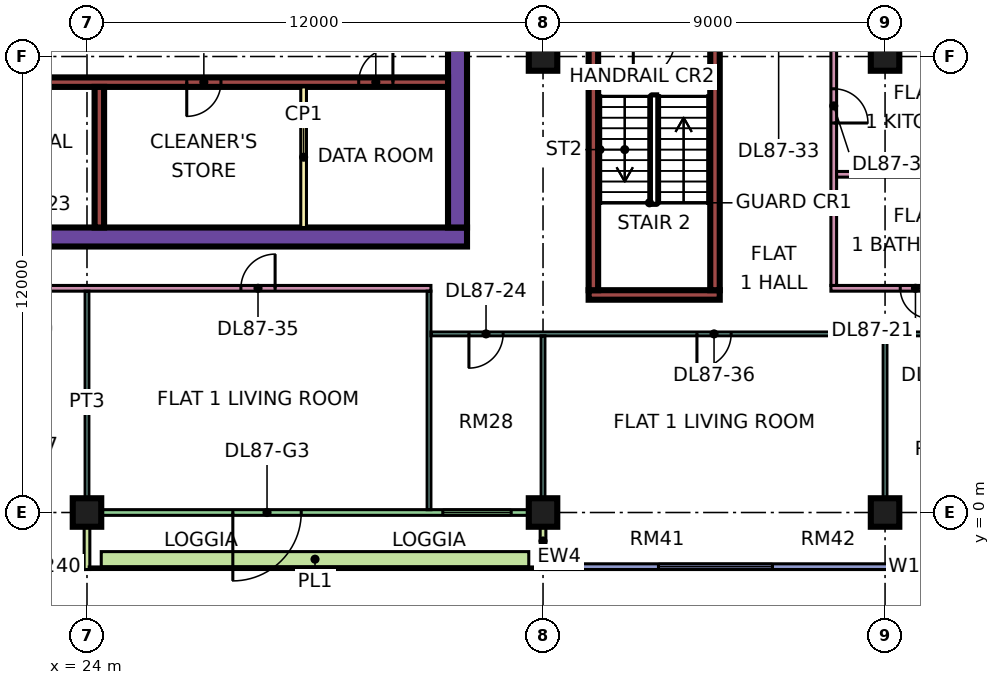
"""IFC4 building model, lengths in metres.
Left out: names, types, materials, properties, quantities, classifications, styles, units other than length and angle.
Written with IfcOpenShell. Run it as: python <this file> out.ifc"""

import sys

from ifc_helpers import new_model, si_unit, direction, frame, frame_2d, origin, origin_2d, place, context, subcontext, project, spatial, rectangle, extrude, element, fill, save


model = new_model("IFC4")
c1 = context("Model", 3, precision=1e-05, world=origin(), true_north=direction((0.0, 1.0)))
c2 = subcontext(c1, "Body", "Model", "MODEL_VIEW")
j1 = project(units=[si_unit("LENGTHUNIT", "METRE"), si_unit("PLANEANGLEUNIT", "RADIAN")], contexts=[c1])
p1 = place(None, origin())
s1 = spatial("IfcSite", under=j1, at=p1, CompositionType="ELEMENT")
p2 = place(p1, origin())
s2 = spatial("IfcBuilding", under=s1, at=p2, CompositionType="ELEMENT")
p3 = place(p2, frame((0.0, 0.0, 372.65)))
s3 = spatial("IfcBuildingStorey", under=s2, at=p3, CompositionType="ELEMENT", Elevation=372.65)
for number, where, z_axis, x_axis in (
    (1, (24.0, 0.0, 0.0), (0.0, 0.0, 1.0), (1.0, 0.0, 0.0)),
    (2, (36.0, 0.0, 0.0), (0.0, 0.0, 1.0), (1.0, 0.0, 0.0)),
    (3, (36.0, 12.0, 0.0), (0.0, 0.0, 1.0), (1.0, 0.0, 0.0)),
    (4, (45.0, 0.0, 0.0), (0.0, 0.0, 1.0), (1.0, 0.0, 0.0)),
    (5, (45.0, 12.0, 0.0), (0.0, 0.0, 1.0), (1.0, 0.0, 0.0)),
):
    element("IfcColumn", number, at=place(p3, frame(where, z_axis=z_axis, x_axis=x_axis)), inside=s3, PredefinedType="COLUMN", context=c2, shape_type="SweptSolid", body=[
        extrude(rectangle(XDim=0.75, YDim=0.75, at=origin_2d()), origin(), (0.0, 0.0, 1.0), 3.75),
    ])
p4 = place(p3, frame((9.0, 7.25, 0.0), z_axis=(0.0, 0.0, 1.0), x_axis=(1.0, 0.0, 0.0)))
e6 = element("IfcWall", 6, at=p4, inside=s3, PredefinedType="SHEAR", context=c2, shape_type="SweptSolid", body=[
    extrude(rectangle(XDim=25.0, YDim=0.5, at=frame_2d((12.5, 0.0))), origin(), (0.0, 0.0, 1.0), 3.75),
])
p5 = place(p3, frame((33.75, 7.5, 0.0), z_axis=(0.0, 0.0, 1.0), x_axis=(0.0, 1.0, 0.0)))
e7 = element("IfcWall", 7, at=p5, inside=s3, PredefinedType="SHEAR", context=c2, shape_type="SweptSolid", body=[
    extrude(rectangle(XDim=12.0, YDim=0.5, at=frame_2d((6.0, 0.0))), origin(), (0.0, 0.0, 1.0), 3.75),
])
p6 = place(p5, frame((5.7, 0.0, 0.0)))
e8 = element("IfcOpeningElement", 8, at=p6, cuts=e7, PredefinedType="OPENING", context=c2, shape_type="SweptSolid", body=[
    extrude(rectangle(XDim=1.8, YDim=2.4, at=frame_2d((0.9, 1.2))), frame((0.0, 0.26, 0.0), z_axis=(0.0, -1.0, 0.0), x_axis=(1.0, 0.0, 0.0)), (0.0, 0.0, 1.0), 0.52),
])
p7 = place(p3, frame((13.45, 11.325, 0.0), z_axis=(0.0, 0.0, 1.0), x_axis=(1.0, 0.0, 0.0)))
e9 = element("IfcWall", 9, at=p7, inside=s3, PredefinedType="SHEAR", context=c2, shape_type="SweptSolid", body=[
    extrude(rectangle(XDim=20.05, YDim=0.25, at=frame_2d((10.025, 0.0))), origin(), (0.0, 0.0, 1.0), 3.75),
])
p8 = place(p7, frame((2.8, 0.0, 0.0)))
e10 = element("IfcOpeningElement", 10, at=p8, cuts=e9, PredefinedType="OPENING", context=c2, shape_type="SweptSolid", body=[
    extrude(rectangle(XDim=0.9, YDim=2.1, at=frame_2d((0.45, 1.05))), frame((0.0, 0.135, 0.0), z_axis=(0.0, -1.0, 0.0), x_axis=(1.0, 0.0, 0.0)), (0.0, 0.0, 1.0), 0.27),
])
p9 = place(p7, frame((8.175, 0.0, 0.0)))
e11 = element("IfcOpeningElement", 11, at=p9, cuts=e9, PredefinedType="OPENING", context=c2, shape_type="SweptSolid", body=[
    extrude(rectangle(XDim=0.9, YDim=2.1, at=frame_2d((0.45, 1.05))), frame((0.0, 0.135, 0.0), z_axis=(0.0, -1.0, 0.0), x_axis=(1.0, 0.0, 0.0)), (0.0, 0.0, 1.0), 0.27),
])
p10 = place(p7, frame((13.175, 0.0, 0.0)))
e12 = element("IfcOpeningElement", 12, at=p10, cuts=e9, PredefinedType="OPENING", context=c2, shape_type="SweptSolid", body=[
    extrude(rectangle(XDim=0.9, YDim=2.1, at=frame_2d((0.45, 1.05))), frame((0.0, 0.135, 0.0), z_axis=(0.0, -1.0, 0.0), x_axis=(1.0, 0.0, 0.0)), (0.0, 0.0, 1.0), 0.27),
])
p11 = place(p7, frame((17.7, 0.0, 0.0)))
e13 = element("IfcOpeningElement", 13, at=p11, cuts=e9, PredefinedType="OPENING", context=c2, shape_type="SweptSolid", body=[
    extrude(rectangle(XDim=0.9, YDim=2.1, at=frame_2d((0.45, 1.05))), frame((0.0, 0.135, 0.0), z_axis=(0.0, -1.0, 0.0), x_axis=(1.0, 0.0, 0.0)), (0.0, 0.0, 1.0), 0.27),
])
p12 = place(p3, frame((24.325, 7.5, 0.0), z_axis=(0.0, 0.0, 1.0), x_axis=(0.0, 1.0, 0.0)))
e14 = element("IfcWall", 14, at=p12, inside=s3, PredefinedType="SHEAR", context=c2, shape_type="SweptSolid", body=[
    extrude(rectangle(XDim=3.7, YDim=0.25, at=frame_2d((1.85, 0.0))), origin(), (0.0, 0.0, 1.0), 3.75),
])
p13 = place(p3, frame((37.2, 5.725, 0.0), z_axis=(0.0, 0.0, 1.0), x_axis=(1.0, 0.0, 0.0)))
e15 = element("IfcWall", 15, at=p13, inside=s3, PredefinedType="SHEAR", context=c2, shape_type="SweptSolid", body=[
    extrude(rectangle(XDim=3.45, YDim=0.25, at=frame_2d((1.725, 0.0))), origin(), (0.0, 0.0, 1.0), 3.75),
])
for number, where, z_axis, x_axis in (
    (16, (37.325, 5.85, 0.0), (0.0, 0.0, 1.0), (0.0, 1.0, 0.0)),
    (17, (40.525, 5.85, 0.0), (0.0, 0.0, 1.0), (0.0, 1.0, 0.0)),
):
    element("IfcWall", number, at=place(p3, frame(where, z_axis=z_axis, x_axis=x_axis)), inside=s3, PredefinedType="SHEAR", context=c2, shape_type="SweptSolid", body=[
        extrude(rectangle(XDim=6.5, YDim=0.25, at=frame_2d((3.25, 0.0))), origin(), (0.0, 0.0, 1.0), 3.75),
    ])
p14 = place(p3, frame((12.5, -1.425, 0.0), z_axis=(0.0, 0.0, 1.0), x_axis=(1.0, 0.0, 0.0)))
e18 = element("IfcWall", 18, at=p14, inside=s3, PredefinedType="SOLIDWALL", context=c2, shape_type="SweptSolid", body=[
    extrude(rectangle(XDim=11.425, YDim=0.15, at=frame_2d((5.712, 0.0))), origin(), (0.0, 0.0, 1.0), 3.35),
])
p15 = place(p14, frame((0.35, 0.0, 0.45)))
e19 = element("IfcOpeningElement", 19, at=p15, cuts=e18, PredefinedType="OPENING", context=c2, shape_type="SweptSolid", body=[
    extrude(rectangle(XDim=1.8, YDim=2.4, at=frame_2d((0.9, 1.2))), frame((0.0, 0.085, 0.0), z_axis=(0.0, -1.0, 0.0), x_axis=(1.0, 0.0, 0.0)), (0.0, 0.0, 1.0), 0.17),
])
p16 = place(p14, frame((4.0, 0.0, 0.45)))
e20 = element("IfcOpeningElement", 20, at=p16, cuts=e18, PredefinedType="OPENING", context=c2, shape_type="SweptSolid", body=[
    extrude(rectangle(XDim=3.0, YDim=2.4, at=frame_2d((1.5, 1.2))), frame((0.0, 0.085, 0.0), z_axis=(0.0, -1.0, 0.0), x_axis=(1.0, 0.0, 0.0)), (0.0, 0.0, 1.0), 0.17),
])
p17 = place(p14, frame((9.062, 0.0, 0.45)))
e21 = element("IfcOpeningElement", 21, at=p17, cuts=e18, PredefinedType="OPENING", context=c2, shape_type="SweptSolid", body=[
    extrude(rectangle(XDim=1.8, YDim=2.4, at=frame_2d((0.9, 1.2))), frame((0.0, 0.085, 0.0), z_axis=(0.0, -1.0, 0.0), x_axis=(1.0, 0.0, 0.0)), (0.0, 0.0, 1.0), 0.17),
])
p18 = place(p3, frame((24.075, 0.0, 0.0), z_axis=(0.0, 0.0, 1.0), x_axis=(1.0, 0.0, 0.0)))
e22 = element("IfcWall", 22, at=p18, inside=s3, PredefinedType="SOLIDWALL", context=c2, shape_type="SweptSolid", body=[
    extrude(rectangle(XDim=11.85, YDim=0.15, at=frame_2d((5.925, 0.0))), origin(), (0.0, 0.0, 1.0), 3.35),
])
p19 = place(p18, frame((3.762, 0.0, 0.0)))
e23 = element("IfcOpeningElement", 23, at=p19, cuts=e22, PredefinedType="OPENING", context=c2, shape_type="SweptSolid", body=[
    extrude(rectangle(XDim=1.8, YDim=2.4, at=frame_2d((0.9, 1.2))), frame((0.0, 0.085, 0.0), z_axis=(0.0, -1.0, 0.0), x_axis=(1.0, 0.0, 0.0)), (0.0, 0.0, 1.0), 0.17),
])
p20 = place(p18, frame((9.288, 0.0, 0.45)))
e24 = element("IfcOpeningElement", 24, at=p20, cuts=e22, PredefinedType="OPENING", context=c2, shape_type="SweptSolid", body=[
    extrude(rectangle(XDim=1.8, YDim=2.4, at=frame_2d((0.9, 1.2))), frame((0.0, 0.085, 0.0), z_axis=(0.0, -1.0, 0.0), x_axis=(1.0, 0.0, 0.0)), (0.0, 0.0, 1.0), 0.17),
])
for number, where, z_axis, x_axis in (
    (25, (24.0, -1.5, 0.0), (0.0, 0.0, 1.0), (0.0, 1.0, 0.0)),
    (26, (36.0, -1.5, 0.0), (0.0, 0.0, 1.0), (0.0, 1.0, 0.0)),
):
    element("IfcWall", number, at=place(p3, frame(where, z_axis=z_axis, x_axis=x_axis)), inside=s3, PredefinedType="SOLIDWALL", context=c2, shape_type="SweptSolid", body=[
        extrude(rectangle(XDim=1.5, YDim=0.15, at=frame_2d((0.75, 0.0))), origin(), (0.0, 0.0, 1.0), 3.35),
    ])
p21 = place(p3, frame((36.075, -1.425, 0.0), z_axis=(0.0, 0.0, 1.0), x_axis=(1.0, 0.0, 0.0)))
e27 = element("IfcWall", 27, at=p21, inside=s3, PredefinedType="SOLIDWALL", context=c2, shape_type="SweptSolid", body=[
    extrude(rectangle(XDim=11.85, YDim=0.15, at=frame_2d((5.925, 0.0))), origin(), (0.0, 0.0, 1.0), 3.35),
])
p22 = place(p21, frame((2.962, 0.0, 0.45)))
e28 = element("IfcOpeningElement", 28, at=p22, cuts=e27, PredefinedType="OPENING", context=c2, shape_type="SweptSolid", body=[
    extrude(rectangle(XDim=3.0, YDim=2.4, at=frame_2d((1.5, 1.2))), frame((0.0, 0.085, 0.0), z_axis=(0.0, -1.0, 0.0), x_axis=(1.0, 0.0, 0.0)), (0.0, 0.0, 1.0), 0.17),
])
p23 = place(p21, frame((9.488, 0.0, 0.45)))
e29 = element("IfcOpeningElement", 29, at=p23, cuts=e27, PredefinedType="OPENING", context=c2, shape_type="SweptSolid", body=[
    extrude(rectangle(XDim=1.8, YDim=2.4, at=frame_2d((0.9, 1.2))), frame((0.0, 0.085, 0.0), z_axis=(0.0, -1.0, 0.0), x_axis=(1.0, 0.0, 0.0)), (0.0, 0.0, 1.0), 0.17),
])
p24 = place(p3, frame((24.375, -1.229, 0.0), z_axis=(0.0, 0.0, 1.0), x_axis=(1.0, 0.0, 0.0)))
e30 = element("IfcWall", 30, at=p24, inside=s3, PredefinedType="SOLIDWALL", context=c2, shape_type="SweptSolid", body=[
    extrude(rectangle(XDim=11.25, YDim=0.4, at=frame_2d((5.625, 0.0))), origin(), (0.0, 0.0, 1.0), 0.7),
])
p25 = place(p3, frame((29.7, 7.5, 0.0), z_axis=(0.0, 0.0, 1.0), x_axis=(0.0, 1.0, 0.0)))
e31 = element("IfcWall", 31, at=p25, inside=s3, PredefinedType="PARTITIONING", context=c2, shape_type="SweptSolid", body=[
    extrude(rectangle(XDim=3.7, YDim=0.15, at=frame_2d((1.85, 0.0))), origin(), (0.0, 0.0, 1.0), 3.35),
])
p26 = place(p3, frame((11.95, 5.9, 0.0), z_axis=(0.0, 0.0, 1.0), x_axis=(1.0, 0.0, 0.0)))
e32 = element("IfcWall", 32, at=p26, inside=s3, PredefinedType="PARTITIONING", context=c2, shape_type="SweptSolid", body=[
    extrude(rectangle(XDim=21.1, YDim=0.15, at=frame_2d((10.55, 0.0))), origin(), (0.0, 0.0, 1.0), 3.35),
])
p27 = place(p26, frame((1.1, 0.0, 0.0)))
e33 = element("IfcOpeningElement", 33, at=p27, cuts=e32, PredefinedType="OPENING", context=c2, shape_type="SweptSolid", body=[
    extrude(rectangle(XDim=0.9, YDim=2.1, at=frame_2d((0.45, 1.05))), frame((0.0, 0.085, 0.0), z_axis=(0.0, -1.0, 0.0), x_axis=(1.0, 0.0, 0.0)), (0.0, 0.0, 1.0), 0.17),
])
p28 = place(p26, frame((10.1, 0.0, 0.0)))
e34 = element("IfcOpeningElement", 34, at=p28, cuts=e32, PredefinedType="OPENING", context=c2, shape_type="SweptSolid", body=[
    extrude(rectangle(XDim=0.9, YDim=2.1, at=frame_2d((0.45, 1.05))), frame((0.0, 0.085, 0.0), z_axis=(0.0, -1.0, 0.0), x_axis=(1.0, 0.0, 0.0)), (0.0, 0.0, 1.0), 0.17),
])
p29 = place(p26, frame((7.1, 0.0, 0.0)))
e35 = element("IfcOpeningElement", 35, at=p29, cuts=e32, PredefinedType="OPENING", context=c2, shape_type="SweptSolid", body=[
    extrude(rectangle(XDim=0.9, YDim=2.1, at=frame_2d((0.45, 1.05))), frame((0.0, 0.085, 0.0), z_axis=(0.0, -1.0, 0.0), x_axis=(1.0, 0.0, 0.0)), (0.0, 0.0, 1.0), 0.17),
])
p30 = place(p26, frame((16.1, 0.0, 0.0)))
e36 = element("IfcOpeningElement", 36, at=p30, cuts=e32, PredefinedType="OPENING", context=c2, shape_type="SweptSolid", body=[
    extrude(rectangle(XDim=0.9, YDim=2.1, at=frame_2d((0.45, 1.05))), frame((0.0, 0.085, 0.0), z_axis=(0.0, -1.0, 0.0), x_axis=(1.0, 0.0, 0.0)), (0.0, 0.0, 1.0), 0.17),
])
p31 = place(p3, frame((24.0, 0.0, 0.0), z_axis=(0.0, 0.0, 1.0), x_axis=(0.0, 1.0, 0.0)))
e37 = element("IfcWall", 37, at=p31, inside=s3, PredefinedType="PARTITIONING", context=c2, shape_type="SweptSolid", body=[
    extrude(rectangle(XDim=5.825, YDim=0.1, at=frame_2d((2.913, 0.0))), origin(), (0.0, 0.0, 1.0), 3.35),
])
p32 = place(p3, frame((33.0, 0.074, 0.0), z_axis=(0.0, 0.0, 1.0), x_axis=(0.0, 1.0, 0.0)))
e38 = element("IfcWall", 38, at=p32, inside=s3, PredefinedType="PARTITIONING", context=c2, shape_type="SweptSolid", body=[
    extrude(rectangle(XDim=5.751, YDim=0.1, at=frame_2d((2.875, 0.0))), origin(), (0.0, 0.0, 1.0), 3.35),
])
p33 = place(p3, frame((33.05, 4.7, 0.0), z_axis=(0.0, 0.0, 1.0), x_axis=(1.0, 0.0, 0.0)))
e39 = element("IfcWall", 39, at=p33, inside=s3, PredefinedType="PARTITIONING", context=c2, shape_type="SweptSolid", body=[
    extrude(rectangle(XDim=20.876, YDim=0.1, at=frame_2d((10.438, 0.0))), origin(), (0.0, 0.0, 1.0), 3.35),
])
p34 = place(p33, frame((1.0, 0.0, 0.0)))
e40 = element("IfcOpeningElement", 40, at=p34, cuts=e39, PredefinedType="OPENING", context=c2, shape_type="SweptSolid", body=[
    extrude(rectangle(XDim=0.9, YDim=2.1, at=frame_2d((0.45, 1.05))), frame((0.0, 0.06, 0.0), z_axis=(0.0, -1.0, 0.0), x_axis=(1.0, 0.0, 0.0)), (0.0, 0.0, 1.0), 0.12),
])
p35 = place(p33, frame((13.0, 0.0, 0.0)))
e41 = element("IfcOpeningElement", 41, at=p35, cuts=e39, PredefinedType="OPENING", context=c2, shape_type="SweptSolid", body=[
    extrude(rectangle(XDim=0.9, YDim=2.1, at=frame_2d((0.45, 1.05))), frame((0.0, 0.06, 0.0), z_axis=(0.0, -1.0, 0.0), x_axis=(1.0, 0.0, 0.0)), (0.0, 0.0, 1.0), 0.12),
])
p36 = place(p33, frame((16.0, 0.0, 0.0)))
e42 = element("IfcOpeningElement", 42, at=p36, cuts=e39, PredefinedType="OPENING", context=c2, shape_type="SweptSolid", body=[
    extrude(rectangle(XDim=0.9, YDim=2.1, at=frame_2d((0.45, 1.05))), frame((0.0, 0.06, 0.0), z_axis=(0.0, -1.0, 0.0), x_axis=(1.0, 0.0, 0.0)), (0.0, 0.0, 1.0), 0.12),
])
p37 = place(p33, frame((19.0, 0.0, 0.0)))
e43 = element("IfcOpeningElement", 43, at=p37, cuts=e39, PredefinedType="OPENING", context=c2, shape_type="SweptSolid", body=[
    extrude(rectangle(XDim=0.9, YDim=2.1, at=frame_2d((0.45, 1.05))), frame((0.0, 0.06, 0.0), z_axis=(0.0, -1.0, 0.0), x_axis=(1.0, 0.0, 0.0)), (0.0, 0.0, 1.0), 0.12),
])
p38 = place(p33, frame((7.0, 0.0, 0.0)))
e44 = element("IfcOpeningElement", 44, at=p38, cuts=e39, PredefinedType="OPENING", context=c2, shape_type="SweptSolid", body=[
    extrude(rectangle(XDim=0.9, YDim=2.1, at=frame_2d((0.45, 1.05))), frame((0.0, 0.06, 0.0), z_axis=(0.0, -1.0, 0.0), x_axis=(1.0, 0.0, 0.0)), (0.0, 0.0, 1.0), 0.12),
])
p39 = place(p3, frame((36.0, 0.0, 0.0), z_axis=(0.0, 0.0, 1.0), x_axis=(0.0, 1.0, 0.0)))
e45 = element("IfcWall", 45, at=p39, inside=s3, PredefinedType="PARTITIONING", context=c2, shape_type="SweptSolid", body=[
    extrude(rectangle(XDim=4.65, YDim=0.1, at=frame_2d((2.325, 0.0))), origin(), (0.0, 0.0, 1.0), 3.35),
])
p40 = place(p3, frame((43.575, 5.9, 0.0), z_axis=(0.0, 0.0, 1.0), x_axis=(1.0, 0.0, 0.0)))
e46 = element("IfcWall", 46, at=p40, inside=s3, PredefinedType="PARTITIONING", context=c2, shape_type="SweptSolid", body=[
    extrude(rectangle(XDim=10.351, YDim=0.15, at=frame_2d((5.176, 0.0))), origin(), (0.0, 0.0, 1.0), 3.35),
])
p41 = place(p40, frame((1.825, 0.0, 0.0)))
e47 = element("IfcOpeningElement", 47, at=p41, cuts=e46, PredefinedType="OPENING", context=c2, shape_type="SweptSolid", body=[
    extrude(rectangle(XDim=0.8, YDim=2.1, at=frame_2d((0.4, 1.05))), frame((0.0, 0.085, 0.0), z_axis=(0.0, -1.0, 0.0), x_axis=(1.0, 0.0, 0.0)), (0.0, 0.0, 1.0), 0.17),
])
p42 = place(p40, frame((6.975, 0.0, 0.0)))
e48 = element("IfcOpeningElement", 48, at=p42, cuts=e46, PredefinedType="OPENING", context=c2, shape_type="SweptSolid", body=[
    extrude(rectangle(XDim=0.9, YDim=2.1, at=frame_2d((0.45, 1.05))), frame((0.0, 0.085, 0.0), z_axis=(0.0, -1.0, 0.0), x_axis=(1.0, 0.0, 0.0)), (0.0, 0.0, 1.0), 0.17),
])
p43 = place(p3, frame((43.65, 5.975, 0.0), z_axis=(0.0, 0.0, 1.0), x_axis=(0.0, 1.0, 0.0)))
e49 = element("IfcWall", 49, at=p43, inside=s3, PredefinedType="PARTITIONING", context=c2, shape_type="SweptSolid", body=[
    extrude(rectangle(XDim=6.3, YDim=0.15, at=frame_2d((3.15, 0.0))), origin(), (0.0, 0.0, 1.0), 3.35),
])
p44 = place(p43, frame((4.275, 0.0, 0.0)))
e50 = element("IfcOpeningElement", 50, at=p44, cuts=e49, PredefinedType="OPENING", context=c2, shape_type="SweptSolid", body=[
    extrude(rectangle(XDim=0.9, YDim=2.1, at=frame_2d((0.45, 1.05))), frame((0.0, 0.085, 0.0), z_axis=(0.0, -1.0, 0.0), x_axis=(1.0, 0.0, 0.0)), (0.0, 0.0, 1.0), 0.17),
])
p45 = place(p3, frame((43.725, 8.9, 0.0), z_axis=(0.0, 0.0, 1.0), x_axis=(1.0, 0.0, 0.0)))
e51 = element("IfcWall", 51, at=p45, inside=s3, PredefinedType="PARTITIONING", context=c2, shape_type="SweptSolid", body=[
    extrude(rectangle(XDim=4.2, YDim=0.15, at=frame_2d((2.1, 0.0))), origin(), (0.0, 0.0, 1.0), 3.35),
])
p46 = place(p3, frame((45.0, 0.0, 0.0), z_axis=(0.0, 0.0, 1.0), x_axis=(0.0, 1.0, 0.0)))
e52 = element("IfcWall", 52, at=p46, inside=s3, PredefinedType="PARTITIONING", context=c2, shape_type="SweptSolid", body=[
    extrude(rectangle(XDim=4.65, YDim=0.1, at=frame_2d((2.325, 0.0))), origin(), (0.0, 0.0, 1.0), 3.35),
])
p47 = place(p17, origin())
e53 = element("IfcWindow", 53, at=p47, inside=s3, PartitioningType="SINGLE_PANEL", PredefinedType="WINDOW", context=c2, shape_type="SweptSolid", body=[
    extrude(rectangle(XDim=1.8, YDim=2.4, at=frame_2d((0.9, 1.2))), frame((0.0, 0.03, 0.0), z_axis=(0.0, -1.0, 0.0), x_axis=(1.0, 0.0, 0.0)), (0.0, 0.0, 1.0), 0.06),
])
fill(e21, e53)
p48 = place(p19, frame((1.8, 0.0, 0.0), z_axis=(0.0, 0.0, 1.0), x_axis=(-1.0, 0.0, 0.0)))
e54 = element("IfcDoor", 54, at=p48, inside=s3, OperationType="DOUBLE_DOOR_SINGLE_SWING", PredefinedType="DOOR", context=c2, shape_type="SweptSolid", body=[
    extrude(rectangle(XDim=1.8, YDim=2.4, at=frame_2d((0.9, 1.2))), frame((0.0, 0.025, 0.0), z_axis=(0.0, -1.0, 0.0), x_axis=(1.0, 0.0, 0.0)), (0.0, 0.0, 1.0), 0.05),
])
fill(e23, e54)
p49 = place(p20, origin())
e55 = element("IfcWindow", 55, at=p49, inside=s3, PartitioningType="SINGLE_PANEL", PredefinedType="WINDOW", context=c2, shape_type="SweptSolid", body=[
    extrude(rectangle(XDim=1.8, YDim=2.4, at=frame_2d((0.9, 1.2))), frame((0.0, 0.03, 0.0), z_axis=(0.0, -1.0, 0.0), x_axis=(1.0, 0.0, 0.0)), (0.0, 0.0, 1.0), 0.06),
])
fill(e24, e55)
p50 = place(p22, origin())
e56 = element("IfcWindow", 56, at=p50, inside=s3, PartitioningType="SINGLE_PANEL", PredefinedType="WINDOW", context=c2, shape_type="SweptSolid", body=[
    extrude(rectangle(XDim=3.0, YDim=2.4, at=frame_2d((1.5, 1.2))), frame((0.0, 0.03, 0.0), z_axis=(0.0, -1.0, 0.0), x_axis=(1.0, 0.0, 0.0)), (0.0, 0.0, 1.0), 0.06),
])
fill(e28, e56)
p51 = place(p23, origin())
e57 = element("IfcWindow", 57, at=p51, inside=s3, PartitioningType="SINGLE_PANEL", PredefinedType="WINDOW", context=c2, shape_type="SweptSolid", body=[
    extrude(rectangle(XDim=1.8, YDim=2.4, at=frame_2d((0.9, 1.2))), frame((0.0, 0.03, 0.0), z_axis=(0.0, -1.0, 0.0), x_axis=(1.0, 0.0, 0.0)), (0.0, 0.0, 1.0), 0.06),
])
fill(e29, e57)
p52 = place(p10, frame((0.9, 0.0, 0.0), z_axis=(0.0, 0.0, 1.0), x_axis=(-1.0, 0.0, 0.0)))
e58 = element("IfcDoor", 58, at=p52, inside=s3, OperationType="SINGLE_SWING_LEFT", PredefinedType="DOOR", context=c2, shape_type="SweptSolid", body=[
    extrude(rectangle(XDim=0.9, YDim=2.1, at=frame_2d((0.45, 1.05))), frame((0.0, 0.025, 0.0), z_axis=(0.0, -1.0, 0.0), x_axis=(1.0, 0.0, 0.0)), (0.0, 0.0, 1.0), 0.05),
])
fill(e12, e58)
p53 = place(p11, frame((0.9, 0.0, 0.0), z_axis=(0.0, 0.0, 1.0), x_axis=(-1.0, 0.0, 0.0)))
e59 = element("IfcDoor", 59, at=p53, inside=s3, OperationType="SINGLE_SWING_RIGHT", PredefinedType="DOOR", context=c2, shape_type="SweptSolid", body=[
    extrude(rectangle(XDim=0.9, YDim=2.1, at=frame_2d((0.45, 1.05))), frame((0.0, 0.025, 0.0), z_axis=(0.0, -1.0, 0.0), x_axis=(1.0, 0.0, 0.0)), (0.0, 0.0, 1.0), 0.05),
])
fill(e13, e59)
p54 = place(p41, origin())
e60 = element("IfcDoor", 60, at=p54, inside=s3, OperationType="SINGLE_SWING_RIGHT", PredefinedType="DOOR", context=c2, shape_type="SweptSolid", body=[
    extrude(rectangle(XDim=0.8, YDim=2.1, at=frame_2d((0.4, 1.05))), frame((0.0, 0.025, 0.0), z_axis=(0.0, -1.0, 0.0), x_axis=(1.0, 0.0, 0.0)), (0.0, 0.0, 1.0), 0.05),
])
fill(e47, e60)
p55 = place(p34, frame((0.9, 0.0, 0.0), z_axis=(0.0, 0.0, 1.0), x_axis=(-1.0, 0.0, 0.0)))
e61 = element("IfcDoor", 61, at=p55, inside=s3, OperationType="SINGLE_SWING_LEFT", PredefinedType="DOOR", context=c2, shape_type="SweptSolid", body=[
    extrude(rectangle(XDim=0.9, YDim=2.1, at=frame_2d((0.45, 1.05))), frame((0.0, 0.025, 0.0), z_axis=(0.0, -1.0, 0.0), x_axis=(1.0, 0.0, 0.0)), (0.0, 0.0, 1.0), 0.05),
])
fill(e40, e61)
p56 = place(p44, frame((0.9, 0.0, 0.0), z_axis=(0.0, 0.0, 1.0), x_axis=(-1.0, 0.0, 0.0)))
e62 = element("IfcDoor", 62, at=p56, inside=s3, OperationType="SINGLE_SWING_LEFT", PredefinedType="DOOR", context=c2, shape_type="SweptSolid", body=[
    extrude(rectangle(XDim=0.9, YDim=2.1, at=frame_2d((0.45, 1.05))), frame((0.0, 0.025, 0.0), z_axis=(0.0, -1.0, 0.0), x_axis=(1.0, 0.0, 0.0)), (0.0, 0.0, 1.0), 0.05),
])
fill(e50, e62)
p57 = place(p30, frame((0.9, 0.0, 0.0), z_axis=(0.0, 0.0, 1.0), x_axis=(-1.0, 0.0, 0.0)))
e63 = element("IfcDoor", 63, at=p57, inside=s3, OperationType="SINGLE_SWING_RIGHT", PredefinedType="DOOR", context=c2, shape_type="SweptSolid", body=[
    extrude(rectangle(XDim=0.9, YDim=2.1, at=frame_2d((0.45, 1.05))), frame((0.0, 0.025, 0.0), z_axis=(0.0, -1.0, 0.0), x_axis=(1.0, 0.0, 0.0)), (0.0, 0.0, 1.0), 0.05),
])
fill(e36, e63)
p58 = place(p38, frame((0.9, 0.0, 0.0), z_axis=(0.0, 0.0, 1.0), x_axis=(-1.0, 0.0, 0.0)))
e64 = element("IfcDoor", 64, at=p58, inside=s3, OperationType="SINGLE_SWING_LEFT", PredefinedType="DOOR", context=c2, shape_type="SweptSolid", body=[
    extrude(rectangle(XDim=0.9, YDim=2.1, at=frame_2d((0.45, 1.05))), frame((0.0, 0.025, 0.0), z_axis=(0.0, -1.0, 0.0), x_axis=(1.0, 0.0, 0.0)), (0.0, 0.0, 1.0), 0.05),
])
fill(e44, e64)
save(model, sys.argv[1])
